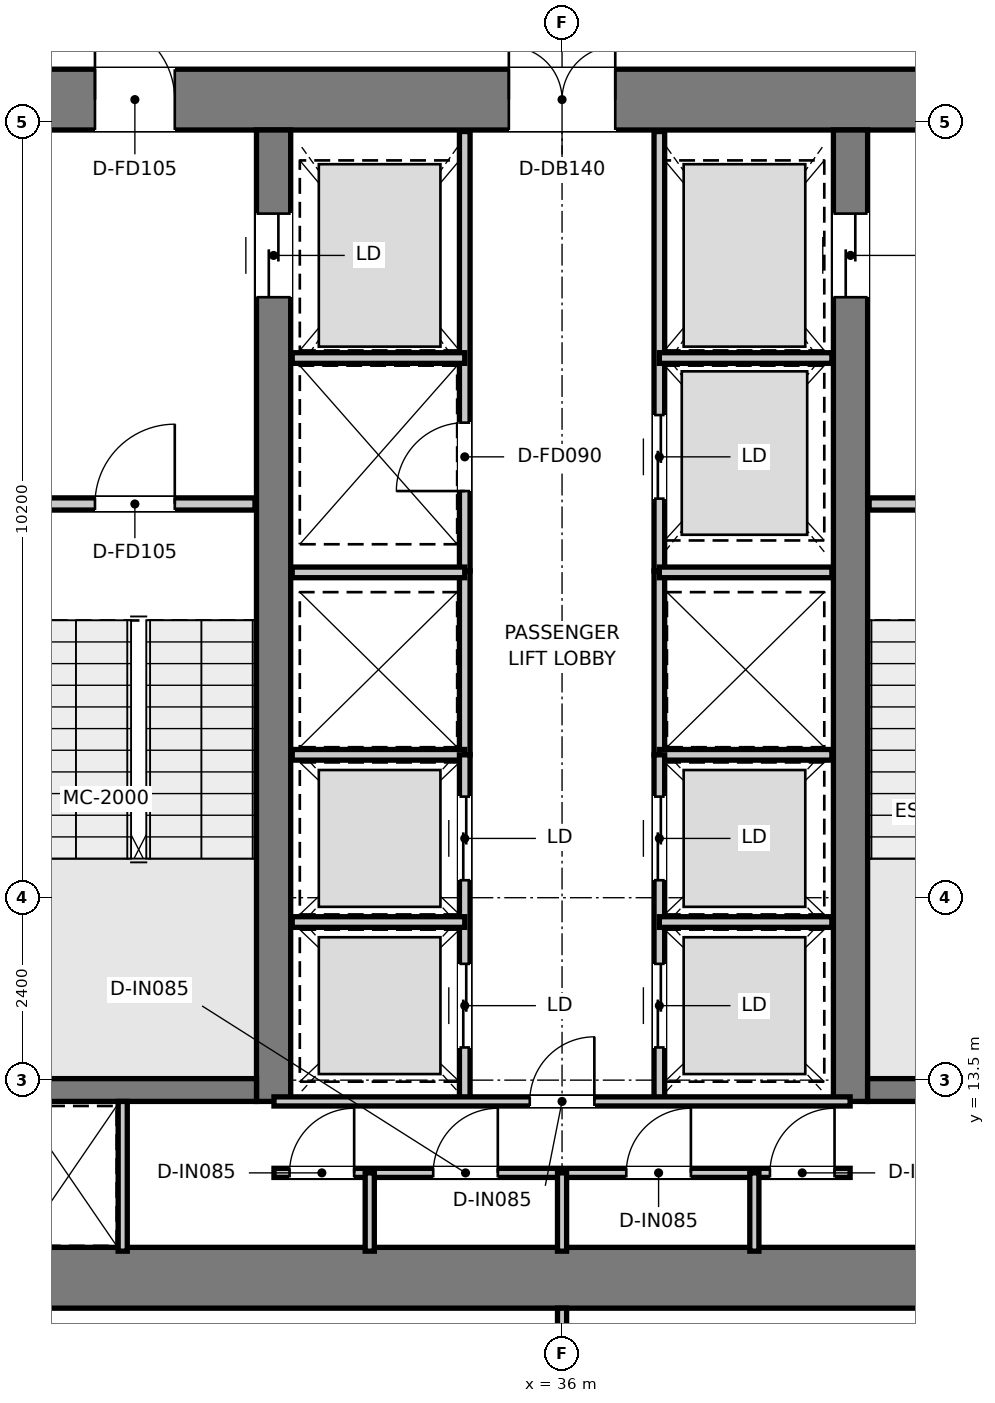
"""IFC4 building model, lengths in metres.
Left out: names, types, materials, properties, quantities, classifications, styles, units other than length and angle.
Written with IfcOpenShell. Run it as: python <this file> out.ifc"""

import sys

from ifc_helpers import new_model, si_unit, direction, frame, frame_2d, origin, place, context, subcontext, project, spatial, rectangle, extrude, element, fill, save


model = new_model("IFC4")
c1 = context("Model", 3, precision=1e-05, world=origin(), true_north=direction((0.0, 1.0)))
c2 = subcontext(c1, "Body", "Model", "MODEL_VIEW")
j1 = project(units=[si_unit("LENGTHUNIT", "METRE"), si_unit("PLANEANGLEUNIT", "RADIAN")], contexts=[c1])
p1 = place(None, origin())
s1 = spatial("IfcSite", under=j1, at=p1, CompositionType="ELEMENT")
p2 = place(p1, origin())
s2 = spatial("IfcBuilding", under=s1, at=p2, CompositionType="ELEMENT")
p3 = place(p2, frame((0.0, 0.0, 121.65)))
s3 = spatial("IfcBuildingStorey", under=s2, at=p3, CompositionType="ELEMENT", Elevation=121.65)
p4 = place(p3, frame((28.08, 10.9, 0.0), z_axis=(0.0, 0.0, 1.0), x_axis=(1.0, 0.0, 0.0)))
e1 = element("IfcWall", 1, at=p4, inside=s3, PredefinedType="SHEAR", context=c2, shape_type="SweptSolid", body=[
    extrude(rectangle(XDim=15.84, YDim=0.8, at=frame_2d((7.92, 0.0))), origin(), (0.0, 0.0, 1.0), 3.95),
])
p5 = place(p3, frame((28.08, 26.4, 0.0), z_axis=(0.0, 0.0, 1.0), x_axis=(1.0, 0.0, 0.0)))
e2 = element("IfcWall", 2, at=p5, inside=s3, PredefinedType="SHEAR", context=c2, shape_type="SweptSolid", body=[
    extrude(rectangle(XDim=15.84, YDim=0.8, at=frame_2d((7.92, 0.0))), origin(), (0.0, 0.0, 1.0), 3.95),
])
p6 = place(p5, frame((7.22, 0.0, 0.0)))
e3 = element("IfcOpeningElement", 3, at=p6, cuts=e2, PredefinedType="OPENING", context=c2, shape_type="SweptSolid", body=[
    extrude(rectangle(XDim=1.4, YDim=2.2, at=frame_2d((0.7, 1.1))), frame((0.0, 0.41, 0.0), z_axis=(0.0, -1.0, 0.0), x_axis=(1.0, 0.0, 0.0)), (0.0, 0.0, 1.0), 0.82),
])
p7 = place(p5, frame((1.775, 0.0, 0.0)))
e4 = element("IfcOpeningElement", 4, at=p7, cuts=e2, PredefinedType="OPENING", context=c2, shape_type="SweptSolid", body=[
    extrude(rectangle(XDim=1.05, YDim=2.1, at=frame_2d((0.525, 1.05))), frame((0.0, 0.41, 0.0), z_axis=(0.0, -1.0, 0.0), x_axis=(1.0, 0.0, 0.0)), (0.0, 0.0, 1.0), 0.82),
])
p8 = place(p5, frame((13.015, 0.0, 0.0)))
e5 = element("IfcOpeningElement", 5, at=p8, cuts=e2, PredefinedType="OPENING", context=c2, shape_type="SweptSolid", body=[
    extrude(rectangle(XDim=1.05, YDim=2.1, at=frame_2d((0.525, 1.05))), frame((0.0, 0.41, 0.0), z_axis=(0.0, -1.0, 0.0), x_axis=(1.0, 0.0, 0.0)), (0.0, 0.0, 1.0), 0.82),
])
p9 = place(p3, frame((32.205, 13.22, 0.0), z_axis=(0.0, 0.0, 1.0), x_axis=(0.0, 1.0, 0.0)))
e6 = element("IfcWall", 6, at=p9, inside=s3, PredefinedType="SHEAR", context=c2, shape_type="SweptSolid", body=[
    extrude(rectangle(XDim=12.78, YDim=0.45, at=frame_2d((6.39, 0.0))), origin(), (0.0, 0.0, 1.0), 3.95),
])
p10 = place(p9, frame((10.58, 0.0, 0.0)))
e7 = element("IfcOpeningElement", 7, at=p10, cuts=e6, PredefinedType="OPENING", context=c2, shape_type="SweptSolid", body=[
    extrude(rectangle(XDim=1.1, YDim=2.15, at=frame_2d((0.55, 1.075))), frame((0.0, 0.235, 0.0), z_axis=(0.0, -1.0, 0.0), x_axis=(1.0, 0.0, 0.0)), (0.0, 0.0, 1.0), 0.47),
])
p11 = place(p3, frame((39.795, 13.22, 0.0), z_axis=(0.0, 0.0, 1.0), x_axis=(0.0, 1.0, 0.0)))
e8 = element("IfcWall", 8, at=p11, inside=s3, PredefinedType="SHEAR", context=c2, shape_type="SweptSolid", body=[
    extrude(rectangle(XDim=12.78, YDim=0.45, at=frame_2d((6.39, 0.0))), origin(), (0.0, 0.0, 1.0), 3.95),
])
p12 = place(p11, frame((10.58, 0.0, 0.0)))
e9 = element("IfcOpeningElement", 9, at=p12, cuts=e8, PredefinedType="OPENING", context=c2, shape_type="SweptSolid", body=[
    extrude(rectangle(XDim=1.1, YDim=2.15, at=frame_2d((0.55, 1.075))), frame((0.0, 0.235, 0.0), z_axis=(0.0, -1.0, 0.0), x_axis=(1.0, 0.0, 0.0)), (0.0, 0.0, 1.0), 0.47),
])
for number, where, z_axis, x_axis in (
    (10, (28.88, 13.37, 0.0), (0.0, 0.0, 1.0), (1.0, 0.0, 0.0)),
    (11, (40.02, 13.37, 0.0), (0.0, 0.0, 1.0), (1.0, 0.0, 0.0)),
):
    element("IfcWall", number, at=place(p3, frame(where, z_axis=z_axis, x_axis=x_axis)), inside=s3, PredefinedType="SHEAR", context=c2, shape_type="SweptSolid", body=[
        extrude(rectangle(XDim=3.1, YDim=0.3, at=frame_2d((1.55, 0.0))), origin(), (0.0, 0.0, 1.0), 3.95),
    ])
p13 = place(p3, frame((28.8, 21.08, 0.0), z_axis=(0.0, 0.0, 1.0), x_axis=(1.0, 0.0, 0.0)))
e12 = element("IfcWall", 12, at=p13, inside=s3, PredefinedType="PARTITIONING", context=c2, shape_type="SweptSolid", body=[
    extrude(rectangle(XDim=3.16, YDim=0.16, at=frame_2d((1.58, 0.0))), origin(), (0.0, 0.0, 1.0), 3.67),
])
p14 = place(p13, frame((1.055, 0.0, 0.0)))
e13 = element("IfcOpeningElement", 13, at=p14, cuts=e12, PredefinedType="OPENING", context=c2, shape_type="SweptSolid", body=[
    extrude(rectangle(XDim=1.05, YDim=2.1, at=frame_2d((0.525, 1.05))), frame((0.0, 0.09, 0.0), z_axis=(0.0, -1.0, 0.0), x_axis=(1.0, 0.0, 0.0)), (0.0, 0.0, 1.0), 0.18),
])
p15 = place(p3, frame((40.04, 21.08, 0.0), z_axis=(0.0, 0.0, 1.0), x_axis=(1.0, 0.0, 0.0)))
e14 = element("IfcWall", 14, at=p15, inside=s3, PredefinedType="PARTITIONING", context=c2, shape_type="SweptSolid", body=[
    extrude(rectangle(XDim=3.16, YDim=0.16, at=frame_2d((1.58, 0.0))), origin(), (0.0, 0.0, 1.0), 3.67),
])
p16 = place(p15, frame((1.055, 0.0, 0.0)))
e15 = element("IfcOpeningElement", 15, at=p16, cuts=e14, PredefinedType="OPENING", context=c2, shape_type="SweptSolid", body=[
    extrude(rectangle(XDim=1.05, YDim=2.1, at=frame_2d((0.525, 1.05))), frame((0.0, 0.09, 0.0), z_axis=(0.0, -1.0, 0.0), x_axis=(1.0, 0.0, 0.0)), (0.0, 0.0, 1.0), 0.18),
])
p17 = place(p3, frame((34.72, 20.2, 0.0), z_axis=(0.0, 0.0, 1.0), x_axis=(0.0, 1.0, 0.0)))
e16 = element("IfcWall", 16, at=p17, inside=s3, PredefinedType="PARTITIONING", context=c2, shape_type="SweptSolid", body=[
    extrude(rectangle(XDim=5.78, YDim=0.14, at=frame_2d((2.89, 0.0))), origin(), (0.0, 0.0, 1.0), 2.67),
])
p18 = place(p17, frame((1.05, 0.0, 0.0)))
e17 = element("IfcOpeningElement", 17, at=p18, cuts=e16, PredefinedType="OPENING", context=c2, shape_type="SweptSolid", body=[
    extrude(rectangle(XDim=0.9, YDim=2.1, at=frame_2d((0.45, 1.05))), frame((0.0, 0.08, 0.0), z_axis=(0.0, -1.0, 0.0), x_axis=(1.0, 0.0, 0.0)), (0.0, 0.0, 1.0), 0.16),
])
p19 = place(p3, frame((37.28, 20.2, 0.0), z_axis=(0.0, 0.0, 1.0), x_axis=(0.0, 1.0, 0.0)))
e18 = element("IfcWall", 18, at=p19, inside=s3, PredefinedType="PARTITIONING", context=c2, shape_type="SweptSolid", body=[
    extrude(rectangle(XDim=5.78, YDim=0.14, at=frame_2d((2.89, 0.0))), origin(), (0.0, 0.0, 1.0), 2.67),
])
p20 = place(p19, frame((0.95, 0.0, 0.0)))
e19 = element("IfcOpeningElement", 19, at=p20, cuts=e18, PredefinedType="OPENING", context=c2, shape_type="SweptSolid", body=[
    extrude(rectangle(XDim=1.1, YDim=2.15, at=frame_2d((0.55, 1.075))), frame((0.0, 0.08, 0.0), z_axis=(0.0, -1.0, 0.0), x_axis=(1.0, 0.0, 0.0)), (0.0, 0.0, 1.0), 0.16),
])
for number, where, z_axis, x_axis in (
    (20, (32.45, 23.0, 0.0), (0.0, 0.0, 1.0), (1.0, 0.0, 0.0)),
    (21, (37.28, 23.0, 0.0), (0.0, 0.0, 1.0), (1.0, 0.0, 0.0)),
):
    element("IfcWall", number, at=place(p3, frame(where, z_axis=z_axis, x_axis=x_axis)), inside=s3, PredefinedType="PARTITIONING", context=c2, shape_type="SweptSolid", body=[
        extrude(rectangle(XDim=2.27, YDim=0.14, at=frame_2d((1.135, 0.0))), origin(), (0.0, 0.0, 1.0), 2.67),
    ])
for number, where, z_axis, x_axis in (
    (22, (34.72, 17.78, 0.0), (0.0, 0.0, 1.0), (0.0, 1.0, 0.0)),
    (23, (37.28, 17.78, 0.0), (0.0, 0.0, 1.0), (0.0, 1.0, 0.0)),
):
    element("IfcWall", number, at=place(p3, frame(where, z_axis=z_axis, x_axis=x_axis)), inside=s3, PredefinedType="PARTITIONING", context=c2, shape_type="SweptSolid", body=[
        extrude(rectangle(XDim=2.42, YDim=0.14, at=frame_2d((1.21, 0.0))), origin(), (0.0, 0.0, 1.0), 3.67),
    ])
for number, where, z_axis, x_axis in (
    (24, (32.45, 17.78, 0.0), (0.0, 0.0, 1.0), (1.0, 0.0, 0.0)),
    (25, (32.45, 20.18, 0.0), (0.0, 0.0, 1.0), (1.0, 0.0, 0.0)),
    (26, (37.28, 17.78, 0.0), (0.0, 0.0, 1.0), (1.0, 0.0, 0.0)),
    (27, (37.28, 20.18, 0.0), (0.0, 0.0, 1.0), (1.0, 0.0, 0.0)),
):
    element("IfcWall", number, at=place(p3, frame(where, z_axis=z_axis, x_axis=x_axis)), inside=s3, PredefinedType="PARTITIONING", context=c2, shape_type="SweptSolid", body=[
        extrude(rectangle(XDim=2.27, YDim=0.14, at=frame_2d((1.135, 0.0))), origin(), (0.0, 0.0, 1.0), 3.67),
    ])
p21 = place(p3, frame((34.72, 13.22, 0.0), z_axis=(0.0, 0.0, 1.0), x_axis=(0.0, 1.0, 0.0)))
e28 = element("IfcWall", 28, at=p21, inside=s3, PredefinedType="PARTITIONING", context=c2, shape_type="SweptSolid", body=[
    extrude(rectangle(XDim=4.56, YDim=0.14, at=frame_2d((2.28, 0.0))), origin(), (0.0, 0.0, 1.0), 3.67),
])
p22 = place(p21, frame((0.71, 0.0, 0.0)))
e29 = element("IfcOpeningElement", 29, at=p22, cuts=e28, PredefinedType="OPENING", context=c2, shape_type="SweptSolid", body=[
    extrude(rectangle(XDim=1.1, YDim=2.15, at=frame_2d((0.55, 1.075))), frame((0.0, 0.08, 0.0), z_axis=(0.0, -1.0, 0.0), x_axis=(1.0, 0.0, 0.0)), (0.0, 0.0, 1.0), 0.16),
])
p23 = place(p21, frame((2.91, 0.0, 0.0)))
e30 = element("IfcOpeningElement", 30, at=p23, cuts=e28, PredefinedType="OPENING", context=c2, shape_type="SweptSolid", body=[
    extrude(rectangle(XDim=1.1, YDim=2.15, at=frame_2d((0.55, 1.075))), frame((0.0, 0.08, 0.0), z_axis=(0.0, -1.0, 0.0), x_axis=(1.0, 0.0, 0.0)), (0.0, 0.0, 1.0), 0.16),
])
p24 = place(p3, frame((32.45, 15.58, 0.0), z_axis=(0.0, 0.0, 1.0), x_axis=(1.0, 0.0, 0.0)))
e31 = element("IfcWall", 31, at=p24, inside=s3, PredefinedType="PARTITIONING", context=c2, shape_type="SweptSolid", body=[
    extrude(rectangle(XDim=2.27, YDim=0.14, at=frame_2d((1.135, 0.0))), origin(), (0.0, 0.0, 1.0), 3.67),
])
p25 = place(p3, frame((37.28, 13.22, 0.0), z_axis=(0.0, 0.0, 1.0), x_axis=(0.0, 1.0, 0.0)))
e32 = element("IfcWall", 32, at=p25, inside=s3, PredefinedType="PARTITIONING", context=c2, shape_type="SweptSolid", body=[
    extrude(rectangle(XDim=4.56, YDim=0.14, at=frame_2d((2.28, 0.0))), origin(), (0.0, 0.0, 1.0), 3.67),
])
p26 = place(p25, frame((0.71, 0.0, 0.0)))
e33 = element("IfcOpeningElement", 33, at=p26, cuts=e32, PredefinedType="OPENING", context=c2, shape_type="SweptSolid", body=[
    extrude(rectangle(XDim=1.1, YDim=2.15, at=frame_2d((0.55, 1.075))), frame((0.0, 0.08, 0.0), z_axis=(0.0, -1.0, 0.0), x_axis=(1.0, 0.0, 0.0)), (0.0, 0.0, 1.0), 0.16),
])
p27 = place(p25, frame((2.91, 0.0, 0.0)))
e34 = element("IfcOpeningElement", 34, at=p27, cuts=e32, PredefinedType="OPENING", context=c2, shape_type="SweptSolid", body=[
    extrude(rectangle(XDim=1.1, YDim=2.15, at=frame_2d((0.55, 1.075))), frame((0.0, 0.08, 0.0), z_axis=(0.0, -1.0, 0.0), x_axis=(1.0, 0.0, 0.0)), (0.0, 0.0, 1.0), 0.16),
])
p28 = place(p3, frame((37.28, 15.58, 0.0), z_axis=(0.0, 0.0, 1.0), x_axis=(1.0, 0.0, 0.0)))
e35 = element("IfcWall", 35, at=p28, inside=s3, PredefinedType="PARTITIONING", context=c2, shape_type="SweptSolid", body=[
    extrude(rectangle(XDim=2.27, YDim=0.14, at=frame_2d((1.135, 0.0))), origin(), (0.0, 0.0, 1.0), 3.67),
])
p29 = place(p3, frame((30.22, 11.25, 0.0), z_axis=(0.0, 0.0, 1.0), x_axis=(0.0, 1.0, 0.0)))
e36 = element("IfcWall", 36, at=p29, inside=s3, PredefinedType="PARTITIONING", context=c2, shape_type="SweptSolid", body=[
    extrude(rectangle(XDim=1.97, YDim=0.12, at=frame_2d((0.985, 0.0))), origin(), (0.0, 0.0, 1.0), 3.67),
])
p30 = place(p3, frame((32.21, 13.22, 0.0), z_axis=(0.0, 0.0, 1.0), x_axis=(1.0, 0.0, 0.0)))
e37 = element("IfcWall", 37, at=p30, inside=s3, PredefinedType="PARTITIONING", context=c2, shape_type="SweptSolid", body=[
    extrude(rectangle(XDim=7.58, YDim=0.12, at=frame_2d((3.79, 0.0))), origin(), (0.0, 0.0, 1.0), 3.67),
])
p31 = place(p30, frame((3.365, 0.0, 0.0)))
e38 = element("IfcOpeningElement", 38, at=p31, cuts=e37, PredefinedType="OPENING", context=c2, shape_type="SweptSolid", body=[
    extrude(rectangle(XDim=0.85, YDim=2.1, at=frame_2d((0.425, 1.05))), frame((0.0, 0.07, 0.0), z_axis=(0.0, -1.0, 0.0), x_axis=(1.0, 0.0, 0.0)), (0.0, 0.0, 1.0), 0.14),
])
p32 = place(p3, frame((32.21, 12.28, 0.0), z_axis=(0.0, 0.0, 1.0), x_axis=(1.0, 0.0, 0.0)))
e39 = element("IfcWall", 39, at=p32, inside=s3, PredefinedType="PARTITIONING", context=c2, shape_type="SweptSolid", body=[
    extrude(rectangle(XDim=7.58, YDim=0.12, at=frame_2d((3.79, 0.0))), origin(), (0.0, 0.0, 1.0), 3.67),
])
p33 = place(p32, frame((0.205, 0.0, 0.0)))
e40 = element("IfcOpeningElement", 40, at=p33, cuts=e39, PredefinedType="OPENING", context=c2, shape_type="SweptSolid", body=[
    extrude(rectangle(XDim=0.85, YDim=2.1, at=frame_2d((0.425, 1.05))), frame((0.0, 0.07, 0.0), z_axis=(0.0, -1.0, 0.0), x_axis=(1.0, 0.0, 0.0)), (0.0, 0.0, 1.0), 0.14),
])
p34 = place(p32, frame((2.095, 0.0, 0.0)))
e41 = element("IfcOpeningElement", 41, at=p34, cuts=e39, PredefinedType="OPENING", context=c2, shape_type="SweptSolid", body=[
    extrude(rectangle(XDim=0.85, YDim=2.1, at=frame_2d((0.425, 1.05))), frame((0.0, 0.07, 0.0), z_axis=(0.0, -1.0, 0.0), x_axis=(1.0, 0.0, 0.0)), (0.0, 0.0, 1.0), 0.14),
])
p35 = place(p32, frame((4.635, 0.0, 0.0)))
e42 = element("IfcOpeningElement", 42, at=p35, cuts=e39, PredefinedType="OPENING", context=c2, shape_type="SweptSolid", body=[
    extrude(rectangle(XDim=0.85, YDim=2.1, at=frame_2d((0.425, 1.05))), frame((0.0, 0.07, 0.0), z_axis=(0.0, -1.0, 0.0), x_axis=(1.0, 0.0, 0.0)), (0.0, 0.0, 1.0), 0.14),
])
p36 = place(p32, frame((6.525, 0.0, 0.0)))
e43 = element("IfcOpeningElement", 43, at=p36, cuts=e39, PredefinedType="OPENING", context=c2, shape_type="SweptSolid", body=[
    extrude(rectangle(XDim=0.85, YDim=2.1, at=frame_2d((0.425, 1.05))), frame((0.0, 0.07, 0.0), z_axis=(0.0, -1.0, 0.0), x_axis=(1.0, 0.0, 0.0)), (0.0, 0.0, 1.0), 0.14),
])
for number, where, z_axis, x_axis in (
    (44, (33.47, 11.25, 0.0), (0.0, 0.0, 1.0), (0.0, 1.0, 0.0)),
    (45, (36.0, 11.25, 0.0), (0.0, 0.0, 1.0), (0.0, 1.0, 0.0)),
    (46, (38.53, 11.25, 0.0), (0.0, 0.0, 1.0), (0.0, 1.0, 0.0)),
):
    element("IfcWall", number, at=place(p3, frame(where, z_axis=z_axis, x_axis=x_axis)), inside=s3, PredefinedType="PARTITIONING", context=c2, shape_type="SweptSolid", body=[
        extrude(rectangle(XDim=1.03, YDim=0.12, at=frame_2d((0.515, 0.0))), origin(), (0.0, 0.0, 1.0), 3.67),
    ])
p37 = place(p3, frame((36.0, 2.028, 0.0), z_axis=(0.0, 0.0, 1.0), x_axis=(0.0, 1.0, 0.0)))
e47 = element("IfcWall", 47, at=p37, inside=s3, PredefinedType="PARTITIONING", context=c2, shape_type="SweptSolid", body=[
    extrude(rectangle(XDim=8.472, YDim=0.12, at=frame_2d((4.236, 0.0))), origin(), (0.0, 0.0, 1.0), 3.67),
])
p38 = place(p14, origin())
e48 = element("IfcDoor", 48, at=p38, inside=s3, OperationType="SINGLE_SWING_RIGHT", PredefinedType="DOOR", context=c2, shape_type="SweptSolid", body=[
    extrude(rectangle(XDim=1.05, YDim=2.1, at=frame_2d((0.525, 1.05))), frame((0.0, 0.025, 0.0), z_axis=(0.0, -1.0, 0.0), x_axis=(1.0, 0.0, 0.0)), (0.0, 0.0, 1.0), 0.05),
])
fill(e13, e48)
p39 = place(p6, origin())
e49 = element("IfcDoor", 49, at=p39, inside=s3, OperationType="DOUBLE_DOOR_SINGLE_SWING", PredefinedType="DOOR", context=c2, shape_type="SweptSolid", body=[
    extrude(rectangle(XDim=1.4, YDim=2.2, at=frame_2d((0.7, 1.1))), frame((0.0, 0.025, 0.0), z_axis=(0.0, -1.0, 0.0), x_axis=(1.0, 0.0, 0.0)), (0.0, 0.0, 1.0), 0.05),
])
fill(e3, e49)
p40 = place(p7, origin())
e50 = element("IfcDoor", 50, at=p40, inside=s3, OperationType="SINGLE_SWING_LEFT", PredefinedType="DOOR", context=c2, shape_type="SweptSolid", body=[
    extrude(rectangle(XDim=1.05, YDim=2.1, at=frame_2d((0.525, 1.05))), frame((0.0, 0.025, 0.0), z_axis=(0.0, -1.0, 0.0), x_axis=(1.0, 0.0, 0.0)), (0.0, 0.0, 1.0), 0.05),
])
fill(e4, e50)
p41 = place(p10, origin())
e51 = element("IfcDoor", 51, at=p41, inside=s3, OperationType="DOUBLE_DOOR_SLIDING", PredefinedType="DOOR", context=c2, shape_type="SweptSolid", body=[
    extrude(rectangle(XDim=1.1, YDim=2.15, at=frame_2d((0.55, 1.075))), frame((0.0, 0.025, 0.0), z_axis=(0.0, -1.0, 0.0), x_axis=(1.0, 0.0, 0.0)), (0.0, 0.0, 1.0), 0.05),
])
fill(e7, e51)
p42 = place(p12, origin())
e52 = element("IfcDoor", 52, at=p42, inside=s3, OperationType="DOUBLE_DOOR_SLIDING", PredefinedType="DOOR", context=c2, shape_type="SweptSolid", body=[
    extrude(rectangle(XDim=1.1, YDim=2.15, at=frame_2d((0.55, 1.075))), frame((0.0, 0.025, 0.0), z_axis=(0.0, -1.0, 0.0), x_axis=(1.0, 0.0, 0.0)), (0.0, 0.0, 1.0), 0.05),
])
fill(e9, e52)
p43 = place(p18, origin())
e53 = element("IfcDoor", 53, at=p43, inside=s3, OperationType="SINGLE_SWING_LEFT", PredefinedType="DOOR", context=c2, shape_type="SweptSolid", body=[
    extrude(rectangle(XDim=0.9, YDim=2.1, at=frame_2d((0.45, 1.05))), frame((0.0, 0.025, 0.0), z_axis=(0.0, -1.0, 0.0), x_axis=(1.0, 0.0, 0.0)), (0.0, 0.0, 1.0), 0.05),
])
fill(e17, e53)
p44 = place(p20, origin())
e54 = element("IfcDoor", 54, at=p44, inside=s3, OperationType="DOUBLE_DOOR_SLIDING", PredefinedType="DOOR", context=c2, shape_type="SweptSolid", body=[
    extrude(rectangle(XDim=1.1, YDim=2.15, at=frame_2d((0.55, 1.075))), frame((0.0, 0.025, 0.0), z_axis=(0.0, -1.0, 0.0), x_axis=(1.0, 0.0, 0.0)), (0.0, 0.0, 1.0), 0.05),
])
fill(e19, e54)
p45 = place(p22, origin())
e55 = element("IfcDoor", 55, at=p45, inside=s3, OperationType="DOUBLE_DOOR_SLIDING", PredefinedType="DOOR", context=c2, shape_type="SweptSolid", body=[
    extrude(rectangle(XDim=1.1, YDim=2.15, at=frame_2d((0.55, 1.075))), frame((0.0, 0.025, 0.0), z_axis=(0.0, -1.0, 0.0), x_axis=(1.0, 0.0, 0.0)), (0.0, 0.0, 1.0), 0.05),
])
fill(e29, e55)
p46 = place(p23, origin())
e56 = element("IfcDoor", 56, at=p46, inside=s3, OperationType="DOUBLE_DOOR_SLIDING", PredefinedType="DOOR", context=c2, shape_type="SweptSolid", body=[
    extrude(rectangle(XDim=1.1, YDim=2.15, at=frame_2d((0.55, 1.075))), frame((0.0, 0.025, 0.0), z_axis=(0.0, -1.0, 0.0), x_axis=(1.0, 0.0, 0.0)), (0.0, 0.0, 1.0), 0.05),
])
fill(e30, e56)
p47 = place(p26, origin())
e57 = element("IfcDoor", 57, at=p47, inside=s3, OperationType="DOUBLE_DOOR_SLIDING", PredefinedType="DOOR", context=c2, shape_type="SweptSolid", body=[
    extrude(rectangle(XDim=1.1, YDim=2.15, at=frame_2d((0.55, 1.075))), frame((0.0, 0.025, 0.0), z_axis=(0.0, -1.0, 0.0), x_axis=(1.0, 0.0, 0.0)), (0.0, 0.0, 1.0), 0.05),
])
fill(e33, e57)
p48 = place(p27, origin())
e58 = element("IfcDoor", 58, at=p48, inside=s3, OperationType="DOUBLE_DOOR_SLIDING", PredefinedType="DOOR", context=c2, shape_type="SweptSolid", body=[
    extrude(rectangle(XDim=1.1, YDim=2.15, at=frame_2d((0.55, 1.075))), frame((0.0, 0.025, 0.0), z_axis=(0.0, -1.0, 0.0), x_axis=(1.0, 0.0, 0.0)), (0.0, 0.0, 1.0), 0.05),
])
fill(e34, e58)
p49 = place(p31, origin())
e59 = element("IfcDoor", 59, at=p49, inside=s3, OperationType="SINGLE_SWING_RIGHT", PredefinedType="DOOR", context=c2, shape_type="SweptSolid", body=[
    extrude(rectangle(XDim=0.85, YDim=2.1, at=frame_2d((0.425, 1.05))), frame((0.0, 0.025, 0.0), z_axis=(0.0, -1.0, 0.0), x_axis=(1.0, 0.0, 0.0)), (0.0, 0.0, 1.0), 0.05),
])
fill(e38, e59)
p50 = place(p33, origin())
e60 = element("IfcDoor", 60, at=p50, inside=s3, OperationType="SINGLE_SWING_RIGHT", PredefinedType="DOOR", context=c2, shape_type="SweptSolid", body=[
    extrude(rectangle(XDim=0.85, YDim=2.1, at=frame_2d((0.425, 1.05))), frame((0.0, 0.025, 0.0), z_axis=(0.0, -1.0, 0.0), x_axis=(1.0, 0.0, 0.0)), (0.0, 0.0, 1.0), 0.05),
])
fill(e40, e60)
p51 = place(p34, origin())
e61 = element("IfcDoor", 61, at=p51, inside=s3, OperationType="SINGLE_SWING_RIGHT", PredefinedType="DOOR", context=c2, shape_type="SweptSolid", body=[
    extrude(rectangle(XDim=0.85, YDim=2.1, at=frame_2d((0.425, 1.05))), frame((0.0, 0.025, 0.0), z_axis=(0.0, -1.0, 0.0), x_axis=(1.0, 0.0, 0.0)), (0.0, 0.0, 1.0), 0.05),
])
fill(e41, e61)
p52 = place(p35, origin())
e62 = element("IfcDoor", 62, at=p52, inside=s3, OperationType="SINGLE_SWING_RIGHT", PredefinedType="DOOR", context=c2, shape_type="SweptSolid", body=[
    extrude(rectangle(XDim=0.85, YDim=2.1, at=frame_2d((0.425, 1.05))), frame((0.0, 0.025, 0.0), z_axis=(0.0, -1.0, 0.0), x_axis=(1.0, 0.0, 0.0)), (0.0, 0.0, 1.0), 0.05),
])
fill(e42, e62)
p53 = place(p36, origin())
e63 = element("IfcDoor", 63, at=p53, inside=s3, OperationType="SINGLE_SWING_RIGHT", PredefinedType="DOOR", context=c2, shape_type="SweptSolid", body=[
    extrude(rectangle(XDim=0.85, YDim=2.1, at=frame_2d((0.425, 1.05))), frame((0.0, 0.025, 0.0), z_axis=(0.0, -1.0, 0.0), x_axis=(1.0, 0.0, 0.0)), (0.0, 0.0, 1.0), 0.05),
])
fill(e43, e63)
save(model, sys.argv[1])
